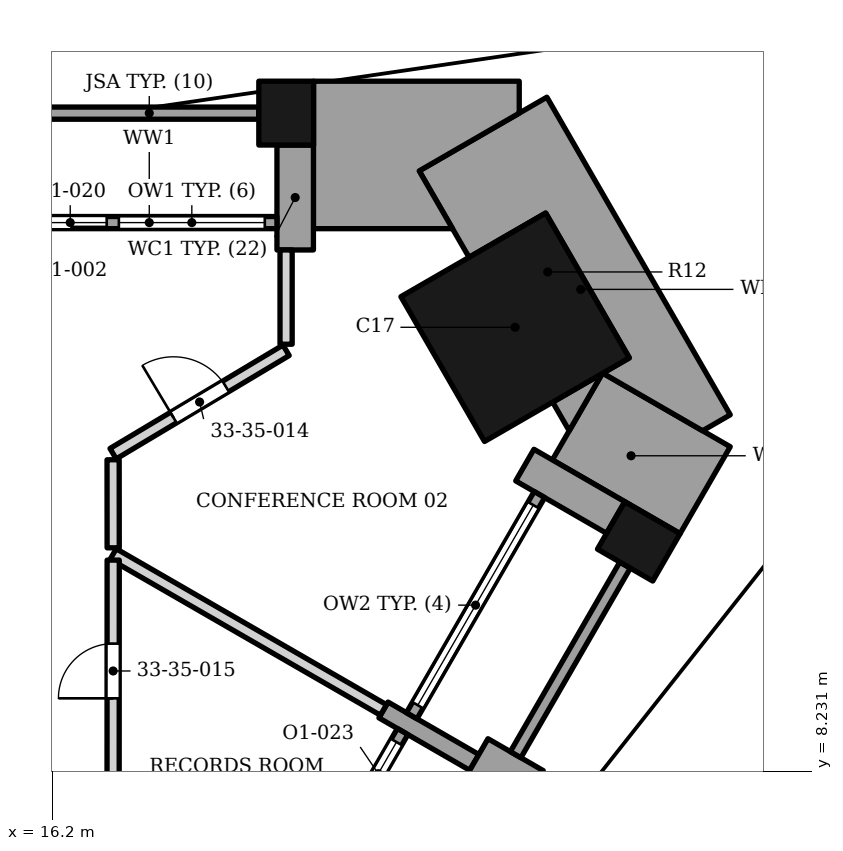
"""IFC4 building model, lengths in metres.
Left out: names, types, materials, properties, quantities, classifications, styles, units other than length and angle.
Written with IfcOpenShell. Run it as: python <this file> out.ifc"""

import sys

from ifc_helpers import new_model, si_unit, direction, frame, frame_2d, origin, origin_2d, place, context, subcontext, project, spatial, polyline, rectangle, outline, extrude, element, fill, save


model = new_model("IFC4")
c1 = context("Model", 3, precision=1e-05, world=origin(), true_north=direction((0.0, 1.0)))
c2 = subcontext(c1, "Body", "Model", "MODEL_VIEW")
j1 = project(units=[si_unit("LENGTHUNIT", "METRE"), si_unit("PLANEANGLEUNIT", "RADIAN")], contexts=[c1])
p1 = place(None, origin())
s1 = spatial("IfcSite", under=j1, at=p1, CompositionType="ELEMENT")
p2 = place(p1, origin())
s2 = spatial("IfcBuilding", under=s1, at=p2, CompositionType="ELEMENT")
p3 = place(p2, frame((0.0, 0.0, 144.6)))
s3 = spatial("IfcBuildingStorey", under=s2, at=p3, CompositionType="ELEMENT", Elevation=144.6)
p4 = place(p3, frame((23.812, 15.531, 0.0), z_axis=(0.0, 0.0, 1.0), x_axis=(-0.866025386331, -0.50000003023, 0.0)))
e1 = element("IfcColumn", 1, at=p4, inside=s3, PredefinedType="COLUMN", context=c2, shape_type="SweptSolid", body=[
    extrude(rectangle(XDim=2.75, YDim=2.75, at=origin_2d()), origin(), (0.0, 0.0, 1.0), 3.9),
])
for number, where, z_axis, x_axis in (
    (2, (25.846, 12.01, 0.0), (0.0, 0.0, 1.0), (0.5, 0.866, 0.0)),
    (3, (20.047, 19.053, 0.0), (0.0, 0.0, 1.0), (-1.0, 0.0, 0.0)),
):
    element("IfcColumn", number, at=place(p3, frame(where, z_axis=z_axis, x_axis=x_axis)), inside=s3, PredefinedType="COLUMN", context=c2, shape_type="SweptSolid", body=[
        extrude(rectangle(XDim=0.9, YDim=1.05, at=origin_2d()), origin(), (0.0, 0.0, 1.0), 3.9),
    ])
p5 = place(p3, frame((23.141, 8.375, 0.0), z_axis=(0.0, 0.0, 1.0), x_axis=(0.866088799389, -0.499890179513, 0.0)))
e4 = element("IfcWall", 4, at=p5, inside=s3, PredefinedType="SOLIDWALL", context=c2, shape_type="SweptSolid", body=[
    extrude(rectangle(XDim=1.05, YDim=0.9, at=frame_2d((0.525, 0.0))), origin(), (0.0, 0.0, 1.0), 3.0),
])
p6 = place(p3, frame((23.141, 8.375, 0.0), z_axis=(0.0, 0.0, 1.0), x_axis=(-0.866013532718, 0.500020560727, 0.0)))
e5 = element("IfcWall", 5, at=p6, inside=s3, PredefinedType="SOLIDWALL", context=c2, shape_type="SweptSolid", body=[
    extrude(rectangle(XDim=1.725, YDim=0.3, at=frame_2d((0.863, 0.0))), origin(), (0.0, 0.0, 1.0), 3.0),
])
p7 = place(p3, frame((25.466, 12.403, 0.0), z_axis=(0.0, 0.0, 1.0), x_axis=(-0.866074815912, 0.499914405916, 0.0)))
e6 = element("IfcWall", 6, at=p7, inside=s3, PredefinedType="SOLIDWALL", context=c2, shape_type="SweptSolid", body=[
    extrude(rectangle(XDim=1.725, YDim=0.6, at=frame_2d((0.862, 0.0))), origin(), (0.0, 0.0, 1.0), 3.0),
])
p8 = place(p3, frame((19.862, 5.246, 0.0), z_axis=(0.0, 0.0, 1.0), x_axis=(0.500027713859, 0.866009402589, 0.0)))
e7 = element("IfcWall", 7, at=p8, inside=s3, PredefinedType="ELEMENTEDWALL", context=c2, shape_type="SweptSolid", body=[
    extrude(rectangle(XDim=4.2, YDim=0.2, at=frame_2d((2.1, 0.0))), origin(), (0.0, 0.0, 1.0), 3.0),
])
p9 = place(p8, frame((0.2, 0.0, 0.45)))
e8 = element("IfcOpeningElement", 8, at=p9, cuts=e7, PredefinedType="OPENING", context=c2, shape_type="SweptSolid", body=[
    extrude(rectangle(XDim=2.4, YDim=2.25, at=frame_2d((1.2, 1.125))), frame((0.0, 0.11, 0.0), z_axis=(0.0, -1.0, 0.0), x_axis=(1.0, 0.0, 0.0)), (0.0, 0.0, 1.0), 0.22),
])
p10 = place(p8, frame((2.8, 0.0, 0.0)))
e9 = element("IfcOpeningElement", 9, at=p10, cuts=e7, PredefinedType="OPENING", context=c2, shape_type="SweptSolid", body=[
    extrude(rectangle(XDim=1.2, YDim=2.7, at=frame_2d((0.6, 1.35))), frame((0.0, 0.11, 0.0), z_axis=(0.0, -1.0, 0.0), x_axis=(1.0, 0.0, 0.0)), (0.0, 0.0, 1.0), 0.22),
])
p11 = place(p3, frame((23.821, 8.503, 0.0), z_axis=(0.0, 0.0, 1.0), x_axis=(0.500012057535, 0.866018442252, 0.0)))
e10 = element("IfcWall", 10, at=p11, inside=s3, PredefinedType="SOLIDWALL", context=c2, shape_type="SweptSolid", body=[
    extrude(rectangle(XDim=3.6, YDim=0.2, at=frame_2d((1.8, 0.0))), origin(), (0.0, 0.0, 1.0), 3.0),
])
p12 = place(p3, frame((22.112, 9.143, 0.0), z_axis=(0.0, 0.0, 1.0), x_axis=(0.500002543286, 0.866023935413, 0.0)))
e11 = element("IfcWall", 11, at=p12, inside=s3, PredefinedType="ELEMENTEDWALL", context=c2, shape_type="SweptSolid", body=[
    extrude(rectangle(XDim=4.2, YDim=0.2, at=frame_2d((2.1, 0.0))), origin(), (0.0, 0.0, 1.0), 3.0),
])
p13 = place(p12, frame((0.2, 0.0, 0.45)))
e12 = element("IfcOpeningElement", 12, at=p13, cuts=e11, PredefinedType="OPENING", context=c2, shape_type="SweptSolid", body=[
    extrude(rectangle(XDim=3.8, YDim=2.25, at=frame_2d((1.9, 1.125))), frame((0.0, 0.11, 0.0), z_axis=(0.0, -1.0, 0.0), x_axis=(1.0, 0.0, 0.0)), (0.0, 0.0, 1.0), 0.22),
])
p14 = place(p3, origin())
e13 = element("IfcWall", 13, at=p14, inside=s3, PredefinedType="SOLIDWALL", context=c2, shape_type="SweptSolid", body=[
    extrude(outline(polyline([(20.495, 16.802), (20.495, 18.528), (19.895, 18.528), (19.895, 16.802), (20.495, 16.802)])), origin(), (0.0, 0.0, 1.0), 3.0),
])
p15 = place(p3, frame((19.595, 19.052, 0.0), z_axis=(0.0, 0.0, 1.0), x_axis=(-1.0, 0.0, 0.0)))
e14 = element("IfcWall", 14, at=p15, inside=s3, PredefinedType="SOLIDWALL", context=c2, shape_type="SweptSolid", body=[
    extrude(rectangle(XDim=3.6, YDim=0.2, at=frame_2d((1.8, 0.0))), origin(), (0.0, 0.0, 1.0), 3.0),
])
p16 = place(p3, frame((19.895, 17.252, 0.0), z_axis=(0.0, 0.0, 1.0), x_axis=(-1.0, 0.0, 0.0)))
e15 = element("IfcWall", 15, at=p16, inside=s3, PredefinedType="ELEMENTEDWALL", context=c2, shape_type="SweptSolid", body=[
    extrude(rectangle(XDim=4.2, YDim=0.2, at=frame_2d((2.1, 0.0))), origin(), (0.0, 0.0, 1.0), 3.0),
])
p17 = place(p16, frame((0.2, 0.0, 0.45)))
e16 = element("IfcOpeningElement", 16, at=p17, cuts=e15, PredefinedType="OPENING", context=c2, shape_type="SweptSolid", body=[
    extrude(rectangle(XDim=2.4, YDim=2.25, at=frame_2d((1.2, 1.125))), frame((0.0, 0.11, 0.0), z_axis=(0.0, -1.0, 0.0), x_axis=(1.0, 0.0, 0.0)), (0.0, 0.0, 1.0), 0.22),
])
p18 = place(p16, frame((2.8, 0.0, 0.0)))
e17 = element("IfcOpeningElement", 17, at=p18, cuts=e15, PredefinedType="OPENING", context=c2, shape_type="SweptSolid", body=[
    extrude(rectangle(XDim=1.2, YDim=2.7, at=frame_2d((0.6, 1.35))), frame((0.0, 0.11, 0.0), z_axis=(0.0, -1.0, 0.0), x_axis=(1.0, 0.0, 0.0)), (0.0, 0.0, 1.0), 0.22),
])
p19 = place(p3, origin())
e18 = element("IfcWall", 18, at=p19, inside=s3, PredefinedType="SOLIDWALL", context=c2, shape_type="SweptSolid", body=[
    extrude(outline(polyline([(25.246, 14.771), (24.425, 13.35), (25.616, 12.662), (25.616, 12.662), (26.525, 12.137), (27.35, 13.567), (25.255, 14.776), (25.246, 14.771)])), origin(), (0.0, 0.0, 1.0), 3.0),
])
p20 = place(p3, origin())
e19 = element("IfcWall", 19, at=p20, inside=s3, PredefinedType="SOLIDWALL", context=c2, shape_type="SweptSolid", body=[
    extrude(outline(polyline([(25.246, 14.771), (24.43, 14.3), (24.702, 13.829), (25.246, 14.771)])), origin(), (0.0, 0.0, 1.0), 3.0),
])
p21 = place(p3, origin())
e20 = element("IfcWall", 20, at=p21, inside=s3, PredefinedType="SOLIDWALL", context=c2, shape_type="SweptSolid", body=[
    extrude(outline(polyline([(24.315, 17.409), (25.69, 15.028), (25.255, 14.776), (26.896, 13.829), (27.35, 14.092), (24.335, 19.315), (22.235, 18.103), (23.055, 16.682), (24.315, 17.409)])), origin(), (0.0, 0.0, 1.0), 3.0),
])
p22 = place(p3, origin())
e21 = element("IfcWall", 21, at=p22, inside=s3, PredefinedType="SOLIDWALL", context=c2, shape_type="SweptSolid", body=[
    extrude(outline(polyline([(20.495, 18.528), (20.495, 17.153), (22.783, 17.153), (22.235, 18.103), (23.88, 19.052), (23.88, 19.578), (20.497, 19.578), (20.497, 18.528), (20.495, 18.528)])), origin(), (0.0, 0.0, 1.0), 3.0),
])
p23 = place(p3, frame((17.202, 11.802, 0.0), z_axis=(0.0, 0.0, 1.0), x_axis=(0.866206970465, -0.499685385335, 0.0)))
e22 = element("IfcWall", 22, at=p23, inside=s3, PredefinedType="PARTITIONING", context=c2, shape_type="SweptSolid", body=[
    extrude(rectangle(XDim=5.132, YDim=0.2, at=frame_2d((2.566, 0.0))), origin(), (0.0, 0.0, 1.0), 3.73),
])
p24 = place(p3, frame((17.2, 7.953, 0.0), z_axis=(0.0, 0.0, 1.0), x_axis=(0.000390701279, 0.999999923676, 0.0)))
e23 = element("IfcWall", 23, at=p24, inside=s3, PredefinedType="PARTITIONING", context=c2, shape_type="SweptSolid", body=[
    extrude(rectangle(XDim=3.749, YDim=0.2, at=frame_2d((1.875, 0.0))), origin(), (0.0, 0.0, 1.0), 3.73),
])
p25 = place(p24, frame((1.476, 0.0, 0.0)))
e24 = element("IfcOpeningElement", 24, at=p25, cuts=e23, PredefinedType="OPENING", context=c2, shape_type="SweptSolid", body=[
    extrude(rectangle(XDim=0.9, YDim=2.1, at=frame_2d((0.45, 1.05))), frame((0.0, 0.11, 0.0), z_axis=(0.0, -1.0, 0.0), x_axis=(1.0, 0.0, 0.0)), (0.0, 0.0, 1.0), 0.22),
])
p26 = place(p3, frame((17.201, 13.352, 0.0), z_axis=(0.0, 0.0, 1.0), x_axis=(0.000843027858, -0.999999644652, 0.0)))
e25 = element("IfcWall", 25, at=p26, inside=s3, PredefinedType="PARTITIONING", context=c2, shape_type="SweptSolid", body=[
    extrude(rectangle(XDim=1.448, YDim=0.2, at=frame_2d((0.724, 0.0))), origin(), (0.0, 0.0, 1.0), 3.73),
])
p27 = place(p3, frame((17.2, 13.452, 0.0), z_axis=(0.0, 0.0, 1.0), x_axis=(0.858479307904, 0.512848201616, 0.0)))
e26 = element("IfcWall", 26, at=p27, inside=s3, PredefinedType="PARTITIONING", context=c2, shape_type="SweptSolid", body=[
    extrude(rectangle(XDim=3.314, YDim=0.2, at=frame_2d((1.657, 0.0))), origin(), (0.0, 0.0, 1.0), 3.73),
])
p28 = place(p27, frame((1.157, 0.0, 0.0)))
e27 = element("IfcOpeningElement", 27, at=p28, cuts=e26, PredefinedType="OPENING", context=c2, shape_type="SweptSolid", body=[
    extrude(rectangle(XDim=1.0, YDim=2.1, at=frame_2d((0.5, 1.05))), frame((0.0, 0.11, 0.0), z_axis=(0.0, -1.0, 0.0), x_axis=(1.0, 0.0, 0.0)), (0.0, 0.0, 1.0), 0.22),
])
p29 = place(p3, frame((20.046, 15.252, 0.0), z_axis=(0.0, 0.0, 1.0), x_axis=(0.000157480313, 0.9999999876, 0.0)))
e28 = element("IfcWall", 28, at=p29, inside=s3, PredefinedType="PARTITIONING", context=c2, shape_type="SweptSolid", body=[
    extrude(rectangle(XDim=1.55, YDim=0.2, at=frame_2d((0.775, 0.0))), origin(), (0.0, 0.0, 1.0), 3.73),
])
p30 = place(p10, origin())
e29 = element("IfcDoor", 29, at=p30, inside=s3, OperationType="SINGLE_SWING_LEFT", PredefinedType="DOOR", context=c2, shape_type="SweptSolid", body=[
    extrude(rectangle(XDim=1.2, YDim=2.7, at=frame_2d((0.6, 1.35))), frame((0.0, 0.025, 0.0), z_axis=(0.0, -1.0, 0.0), x_axis=(1.0, 0.0, 0.0)), (0.0, 0.0, 1.0), 0.05),
])
fill(e9, e29)
p31 = place(p13, origin())
e30 = element("IfcWindow", 30, at=p31, inside=s3, PartitioningType="SINGLE_PANEL", PredefinedType="WINDOW", context=c2, shape_type="SweptSolid", body=[
    extrude(rectangle(XDim=3.8, YDim=2.25, at=frame_2d((1.9, 1.125))), frame((0.0, 0.03, 0.0), z_axis=(0.0, -1.0, 0.0), x_axis=(1.0, 0.0, 0.0)), (0.0, 0.0, 1.0), 0.06),
])
fill(e12, e30)
p32 = place(p17, origin())
e31 = element("IfcWindow", 31, at=p32, inside=s3, PartitioningType="SINGLE_PANEL", PredefinedType="WINDOW", context=c2, shape_type="SweptSolid", body=[
    extrude(rectangle(XDim=2.4, YDim=2.25, at=frame_2d((1.2, 1.125))), frame((0.0, 0.03, 0.0), z_axis=(0.0, -1.0, 0.0), x_axis=(1.0, 0.0, 0.0)), (0.0, 0.0, 1.0), 0.06),
])
fill(e16, e31)
p33 = place(p18, origin())
e32 = element("IfcDoor", 32, at=p33, inside=s3, OperationType="SINGLE_SWING_LEFT", PredefinedType="DOOR", context=c2, shape_type="SweptSolid", body=[
    extrude(rectangle(XDim=1.2, YDim=2.7, at=frame_2d((0.6, 1.35))), frame((0.0, 0.025, 0.0), z_axis=(0.0, -1.0, 0.0), x_axis=(1.0, 0.0, 0.0)), (0.0, 0.0, 1.0), 0.05),
])
fill(e17, e32)
p34 = place(p28, origin())
e33 = element("IfcDoor", 33, at=p34, inside=s3, OperationType="SINGLE_SWING_LEFT", PredefinedType="DOOR", context=c2, shape_type="SweptSolid", body=[
    extrude(rectangle(XDim=1.0, YDim=2.1, at=frame_2d((0.5, 1.05))), frame((0.0, 0.025, 0.0), z_axis=(0.0, -1.0, 0.0), x_axis=(1.0, 0.0, 0.0)), (0.0, 0.0, 1.0), 0.05),
])
fill(e27, e33)
p35 = place(p25, origin())
e34 = element("IfcDoor", 34, at=p35, inside=s3, OperationType="SINGLE_SWING_LEFT", PredefinedType="DOOR", context=c2, shape_type="SweptSolid", body=[
    extrude(rectangle(XDim=0.9, YDim=2.1, at=frame_2d((0.45, 1.05))), frame((0.0, 0.025, 0.0), z_axis=(0.0, -1.0, 0.0), x_axis=(1.0, 0.0, 0.0)), (0.0, 0.0, 1.0), 0.05),
])
fill(e24, e34)
save(model, sys.argv[1])
